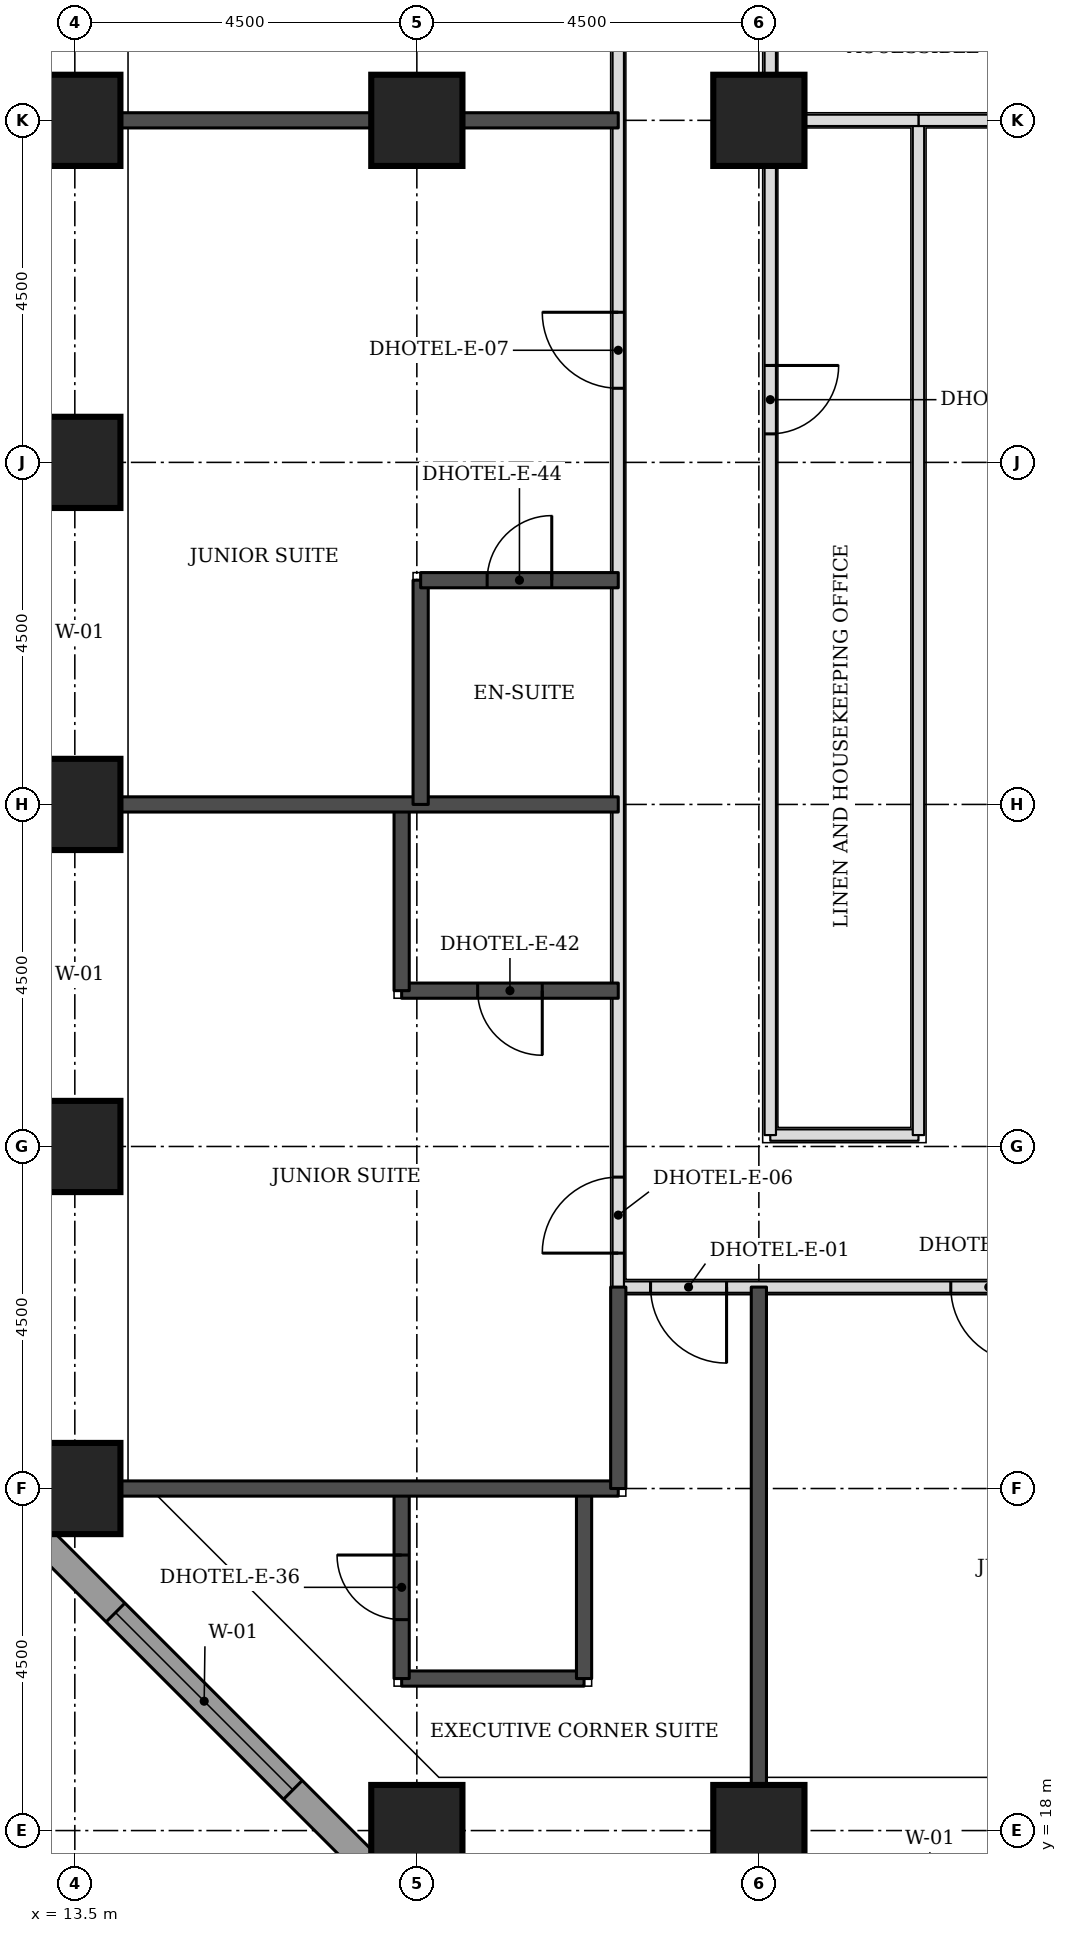
"""IFC4 building model, lengths in metres.
Left out: names, types, materials, properties, quantities, classifications, styles, units other than length and angle.
Written with IfcOpenShell. Run it as: python <this file> out.ifc"""

import sys

from ifc_helpers import new_model, si_unit, direction, frame, frame_2d, origin, origin_2d, place, context, subcontext, project, spatial, rectangle, extrude, element, fill, save


model = new_model("IFC4")
c1 = context("Model", 3, precision=1e-05, world=origin(), true_north=direction((0.0, 1.0)))
c2 = subcontext(c1, "Body", "Model", "MODEL_VIEW")
j1 = project(units=[si_unit("LENGTHUNIT", "METRE"), si_unit("PLANEANGLEUNIT", "RADIAN")], contexts=[c1])
p1 = place(None, origin())
s1 = spatial("IfcSite", under=j1, at=p1, CompositionType="ELEMENT")
p2 = place(p1, origin())
s2 = spatial("IfcBuilding", under=s1, at=p2, CompositionType="ELEMENT")
p3 = place(p2, frame((0.0, 0.0, 62.7)))
s3 = spatial("IfcBuildingStorey", under=s2, at=p3, CompositionType="ELEMENT", Elevation=62.7)
for number, where, z_axis, x_axis in (
    (1, (18.0, 18.0, 0.0), (0.0, 0.0, 1.0), (1.0, 0.0, 0.0)),
    (2, (22.5, 18.0, 0.0), (0.0, 0.0, 1.0), (1.0, 0.0, 0.0)),
    (3, (13.5, 22.5, 0.0), (0.0, 0.0, 1.0), (1.0, 0.0, 0.0)),
    (4, (13.5, 27.0, 0.0), (0.0, 0.0, 1.0), (1.0, 0.0, 0.0)),
    (5, (13.5, 31.5, 0.0), (0.0, 0.0, 1.0), (1.0, 0.0, 0.0)),
    (6, (13.5, 36.0, 0.0), (0.0, 0.0, 1.0), (1.0, 0.0, 0.0)),
    (7, (13.5, 40.5, 0.0), (0.0, 0.0, 1.0), (1.0, 0.0, 0.0)),
    (8, (18.0, 40.5, 0.0), (0.0, 0.0, 1.0), (1.0, 0.0, 0.0)),
    (9, (22.5, 40.5, 0.0), (0.0, 0.0, 1.0), (1.0, 0.0, 0.0)),
):
    element("IfcColumn", number, at=place(p3, frame(where, z_axis=z_axis, x_axis=x_axis)), inside=s3, PredefinedType="COLUMN", context=c2, shape_type="SweptSolid", body=[
        extrude(rectangle(XDim=1.2, YDim=1.2, at=origin_2d()), origin(), (0.0, 0.0, 1.0), 3.3),
    ])
p4 = place(p3, frame((12.674, 22.23, 0.0), z_axis=(0.0, 0.0, 1.0), x_axis=(0.707106781187, -0.707106781187, 0.0)))
e10 = element("IfcWall", 10, at=p4, inside=s3, PredefinedType="STANDARD", context=c2, shape_type="SweptSolid", body=[
    extrude(rectangle(XDim=7.151, YDim=0.35, at=frame_2d((3.576, 0.0))), origin(), (0.0, 0.0, 1.0), 3.055),
])
p5 = place(p4, frame((1.926, 0.0, 0.8)))
e11 = element("IfcOpeningElement", 11, at=p5, cuts=e10, PredefinedType="OPENING", context=c2, shape_type="SweptSolid", body=[
    extrude(rectangle(XDim=3.3, YDim=1.5, at=frame_2d((1.65, 0.75))), frame((0.0, 0.185, 0.0), z_axis=(0.0, -1.0, 0.0), x_axis=(1.0, 0.0, 0.0)), (0.0, 0.0, 1.0), 0.37),
])
p6 = place(p3, frame((20.65, 25.15, 0.0), z_axis=(0.0, 0.0, 1.0), x_axis=(1.0, 0.0, 0.0)))
e12 = element("IfcWall", 12, at=p6, inside=s3, PredefinedType="PARTITIONING", context=c2, shape_type="SweptSolid", body=[
    extrude(rectangle(XDim=32.2, YDim=0.15, at=frame_2d((16.1, 0.0))), origin(), (0.0, 0.0, 1.0), 3.08),
])
p7 = place(p6, frame((4.375, 0.0, 0.0)))
e13 = element("IfcOpeningElement", 13, at=p7, cuts=e12, PredefinedType="OPENING", context=c2, shape_type="SweptSolid", body=[
    extrude(rectangle(XDim=1.0, YDim=2.1, at=frame_2d((0.5, 1.05))), frame((0.0, 0.085, 0.0), z_axis=(0.0, -1.0, 0.0), x_axis=(1.0, 0.0, 0.0)), (0.0, 0.0, 1.0), 0.17),
])
p8 = place(p6, frame((16.075, 0.0, 0.0)))
e14 = element("IfcOpeningElement", 14, at=p8, cuts=e12, PredefinedType="OPENING", context=c2, shape_type="SweptSolid", body=[
    extrude(rectangle(XDim=1.0, YDim=2.1, at=frame_2d((0.5, 1.05))), frame((0.0, 0.085, 0.0), z_axis=(0.0, -1.0, 0.0), x_axis=(1.0, 0.0, 0.0)), (0.0, 0.0, 1.0), 0.17),
])
p9 = place(p6, frame((22.375, 0.0, 0.0)))
e15 = element("IfcOpeningElement", 15, at=p9, cuts=e12, PredefinedType="OPENING", context=c2, shape_type="SweptSolid", body=[
    extrude(rectangle(XDim=1.0, YDim=2.1, at=frame_2d((0.5, 1.05))), frame((0.0, 0.085, 0.0), z_axis=(0.0, -1.0, 0.0), x_axis=(1.0, 0.0, 0.0)), (0.0, 0.0, 1.0), 0.17),
])
p10 = place(p6, frame((0.425, 0.0, 0.0)))
e16 = element("IfcOpeningElement", 16, at=p10, cuts=e12, PredefinedType="OPENING", context=c2, shape_type="SweptSolid", body=[
    extrude(rectangle(XDim=1.0, YDim=2.1, at=frame_2d((0.5, 1.05))), frame((0.0, 0.085, 0.0), z_axis=(0.0, -1.0, 0.0), x_axis=(1.0, 0.0, 0.0)), (0.0, 0.0, 1.0), 0.17),
])
p11 = place(p6, frame((30.025, 0.0, 0.0)))
e17 = element("IfcOpeningElement", 17, at=p11, cuts=e12, PredefinedType="OPENING", context=c2, shape_type="SweptSolid", body=[
    extrude(rectangle(XDim=1.0, YDim=2.1, at=frame_2d((0.5, 1.05))), frame((0.0, 0.085, 0.0), z_axis=(0.0, -1.0, 0.0), x_axis=(1.0, 0.0, 0.0)), (0.0, 0.0, 1.0), 0.17),
])
p12 = place(p3, frame((20.65, 25.15, 0.0), z_axis=(0.0, 0.0, 1.0), x_axis=(0.0, 1.0, 0.0)))
e18 = element("IfcWall", 18, at=p12, inside=s3, PredefinedType="PARTITIONING", context=c2, shape_type="SweptSolid", body=[
    extrude(rectangle(XDim=24.35, YDim=0.15, at=frame_2d((12.175, 0.0))), origin(), (0.0, 0.0, 1.0), 3.08),
])
p13 = place(p12, frame((0.447, 0.0, 0.0)))
e19 = element("IfcOpeningElement", 19, at=p13, cuts=e18, PredefinedType="OPENING", context=c2, shape_type="SweptSolid", body=[
    extrude(rectangle(XDim=1.0, YDim=2.1, at=frame_2d((0.5, 1.05))), frame((0.0, 0.085, 0.0), z_axis=(0.0, -1.0, 0.0), x_axis=(1.0, 0.0, 0.0)), (0.0, 0.0, 1.0), 0.17),
])
p14 = place(p12, frame((11.825, 0.0, 0.0)))
e20 = element("IfcOpeningElement", 20, at=p14, cuts=e18, PredefinedType="OPENING", context=c2, shape_type="SweptSolid", body=[
    extrude(rectangle(XDim=1.0, YDim=2.1, at=frame_2d((0.5, 1.05))), frame((0.0, 0.085, 0.0), z_axis=(0.0, -1.0, 0.0), x_axis=(1.0, 0.0, 0.0)), (0.0, 0.0, 1.0), 0.17),
])
p15 = place(p12, frame((18.125, 0.0, 0.0)))
e21 = element("IfcOpeningElement", 21, at=p15, cuts=e18, PredefinedType="OPENING", context=c2, shape_type="SweptSolid", body=[
    extrude(rectangle(XDim=1.0, YDim=2.1, at=frame_2d((0.5, 1.05))), frame((0.0, 0.085, 0.0), z_axis=(0.0, -1.0, 0.0), x_axis=(1.0, 0.0, 0.0)), (0.0, 0.0, 1.0), 0.17),
])
p16 = place(p3, frame((22.65, 27.15, 0.0), z_axis=(0.0, 0.0, 1.0), x_axis=(1.0, 0.0, 0.0)))
e22 = element("IfcWall", 22, at=p16, inside=s3, PredefinedType="PARTITIONING", context=c2, shape_type="SweptSolid", body=[
    extrude(rectangle(XDim=1.95, YDim=0.15, at=frame_2d((0.975, 0.0))), origin(), (0.0, 0.0, 1.0), 3.08),
])
p17 = place(p3, frame((22.65, 27.15, 0.0), z_axis=(0.0, 0.0, 1.0), x_axis=(0.0, 1.0, 0.0)))
e23 = element("IfcWall", 23, at=p17, inside=s3, PredefinedType="PARTITIONING", context=c2, shape_type="SweptSolid", body=[
    extrude(rectangle(XDim=15.85, YDim=0.15, at=frame_2d((7.925, 0.0))), origin(), (0.0, 0.0, 1.0), 3.08),
])
p18 = place(p17, frame((9.225, 0.0, 0.0)))
e24 = element("IfcOpeningElement", 24, at=p18, cuts=e23, PredefinedType="OPENING", context=c2, shape_type="SweptSolid", body=[
    extrude(rectangle(XDim=0.9, YDim=2.1, at=frame_2d((0.45, 1.05))), frame((0.0, 0.085, 0.0), z_axis=(0.0, -1.0, 0.0), x_axis=(1.0, 0.0, 0.0)), (0.0, 0.0, 1.0), 0.17),
])
p19 = place(p3, frame((24.6, 27.15, 0.0), z_axis=(0.0, 0.0, 1.0), x_axis=(0.0, 1.0, 0.0)))
e25 = element("IfcWall", 25, at=p19, inside=s3, PredefinedType="PARTITIONING", context=c2, shape_type="SweptSolid", body=[
    extrude(rectangle(XDim=13.35, YDim=0.15, at=frame_2d((6.675, 0.0))), origin(), (0.0, 0.0, 1.0), 3.08),
])
p20 = place(p3, frame((24.6, 40.5, 0.0), z_axis=(0.0, 0.0, 1.0), x_axis=(1.0, 0.0, 0.0)))
e26 = element("IfcWall", 26, at=p20, inside=s3, PredefinedType="PARTITIONING", context=c2, shape_type="SweptSolid", body=[
    extrude(rectangle(XDim=2.35, YDim=0.15, at=frame_2d((1.175, 0.0))), origin(), (0.0, 0.0, 1.0), 2.33),
])
p21 = place(p3, frame((22.5, 18.6, 0.0), z_axis=(0.0, 0.0, 1.0), x_axis=(0.0, 1.0, 0.0)))
e27 = element("IfcWall", 27, at=p21, inside=s3, PredefinedType="SOLIDWALL", context=c2, shape_type="SweptSolid", body=[
    extrude(rectangle(XDim=6.55, YDim=0.2, at=frame_2d((3.275, 0.0))), origin(), (0.0, 0.0, 1.0), 3.08),
])
p22 = place(p3, frame((17.8, 20.0, 0.0), z_axis=(0.0, 0.0, 1.0), x_axis=(1.0, 0.0, 0.0)))
e28 = element("IfcWall", 28, at=p22, inside=s3, PredefinedType="SOLIDWALL", context=c2, shape_type="SweptSolid", body=[
    extrude(rectangle(XDim=2.4, YDim=0.2, at=frame_2d((1.2, 0.0))), origin(), (0.0, 0.0, 1.0), 3.08),
])
p23 = place(p3, frame((17.8, 20.0, 0.0), z_axis=(0.0, 0.0, 1.0), x_axis=(0.0, 1.0, 0.0)))
e29 = element("IfcWall", 29, at=p23, inside=s3, PredefinedType="SOLIDWALL", context=c2, shape_type="SweptSolid", body=[
    extrude(rectangle(XDim=2.5, YDim=0.2, at=frame_2d((1.25, 0.0))), origin(), (0.0, 0.0, 1.0), 3.08),
])
p24 = place(p23, frame((0.775, 0.0, 0.0)))
e30 = element("IfcOpeningElement", 30, at=p24, cuts=e29, PredefinedType="OPENING", context=c2, shape_type="SweptSolid", body=[
    extrude(rectangle(XDim=0.85, YDim=2.1, at=frame_2d((0.425, 1.05))), frame((0.0, 0.11, 0.0), z_axis=(0.0, -1.0, 0.0), x_axis=(1.0, 0.0, 0.0)), (0.0, 0.0, 1.0), 0.22),
])
p25 = place(p3, frame((20.2, 20.0, 0.0), z_axis=(0.0, 0.0, 1.0), x_axis=(0.0, 1.0, 0.0)))
e31 = element("IfcWall", 31, at=p25, inside=s3, PredefinedType="SOLIDWALL", context=c2, shape_type="SweptSolid", body=[
    extrude(rectangle(XDim=2.5, YDim=0.2, at=frame_2d((1.25, 0.0))), origin(), (0.0, 0.0, 1.0), 3.08),
])
p26 = place(p3, frame((14.1, 22.5, 0.0), z_axis=(0.0, 0.0, 1.0), x_axis=(1.0, 0.0, 0.0)))
e32 = element("IfcWall", 32, at=p26, inside=s3, PredefinedType="SOLIDWALL", context=c2, shape_type="SweptSolid", body=[
    extrude(rectangle(XDim=6.55, YDim=0.2, at=frame_2d((3.275, 0.0))), origin(), (0.0, 0.0, 1.0), 3.08),
])
p27 = place(p3, frame((20.65, 22.5, 0.0), z_axis=(0.0, 0.0, 1.0), x_axis=(0.0, 1.0, 0.0)))
e33 = element("IfcWall", 33, at=p27, inside=s3, PredefinedType="SOLIDWALL", context=c2, shape_type="SweptSolid", body=[
    extrude(rectangle(XDim=2.65, YDim=0.2, at=frame_2d((1.325, 0.0))), origin(), (0.0, 0.0, 1.0), 3.08),
])
p28 = place(p3, frame((17.8, 29.05, 0.0), z_axis=(0.0, 0.0, 1.0), x_axis=(1.0, 0.0, 0.0)))
e34 = element("IfcWall", 34, at=p28, inside=s3, PredefinedType="SOLIDWALL", context=c2, shape_type="SweptSolid", body=[
    extrude(rectangle(XDim=2.85, YDim=0.2, at=frame_2d((1.425, 0.0))), origin(), (0.0, 0.0, 1.0), 3.08),
])
p29 = place(p28, frame((1.0, 0.0, 0.0)))
e35 = element("IfcOpeningElement", 35, at=p29, cuts=e34, PredefinedType="OPENING", context=c2, shape_type="SweptSolid", body=[
    extrude(rectangle(XDim=0.85, YDim=2.1, at=frame_2d((0.425, 1.05))), frame((0.0, 0.11, 0.0), z_axis=(0.0, -1.0, 0.0), x_axis=(1.0, 0.0, 0.0)), (0.0, 0.0, 1.0), 0.22),
])
p30 = place(p3, frame((17.8, 29.05, 0.0), z_axis=(0.0, 0.0, 1.0), x_axis=(0.0, 1.0, 0.0)))
e36 = element("IfcWall", 36, at=p30, inside=s3, PredefinedType="SOLIDWALL", context=c2, shape_type="SweptSolid", body=[
    extrude(rectangle(XDim=2.45, YDim=0.2, at=frame_2d((1.225, 0.0))), origin(), (0.0, 0.0, 1.0), 3.08),
])
p31 = place(p3, frame((14.1, 31.5, 0.0), z_axis=(0.0, 0.0, 1.0), x_axis=(1.0, 0.0, 0.0)))
e37 = element("IfcWall", 37, at=p31, inside=s3, PredefinedType="SOLIDWALL", context=c2, shape_type="SweptSolid", body=[
    extrude(rectangle(XDim=6.55, YDim=0.2, at=frame_2d((3.275, 0.0))), origin(), (0.0, 0.0, 1.0), 3.08),
])
p32 = place(p3, frame((18.05, 31.5, 0.0), z_axis=(0.0, 0.0, 1.0), x_axis=(0.0, 1.0, 0.0)))
e38 = element("IfcWall", 38, at=p32, inside=s3, PredefinedType="SOLIDWALL", context=c2, shape_type="SweptSolid", body=[
    extrude(rectangle(XDim=2.95, YDim=0.2, at=frame_2d((1.475, 0.0))), origin(), (0.0, 0.0, 1.0), 3.08),
])
p33 = place(p3, frame((18.05, 34.45, 0.0), z_axis=(0.0, 0.0, 1.0), x_axis=(1.0, 0.0, 0.0)))
e39 = element("IfcWall", 39, at=p33, inside=s3, PredefinedType="SOLIDWALL", context=c2, shape_type="SweptSolid", body=[
    extrude(rectangle(XDim=2.6, YDim=0.2, at=frame_2d((1.3, 0.0))), origin(), (0.0, 0.0, 1.0), 3.08),
])
p34 = place(p33, frame((0.875, 0.0, 0.0)))
e40 = element("IfcOpeningElement", 40, at=p34, cuts=e39, PredefinedType="OPENING", context=c2, shape_type="SweptSolid", body=[
    extrude(rectangle(XDim=0.85, YDim=2.1, at=frame_2d((0.425, 1.05))), frame((0.0, 0.11, 0.0), z_axis=(0.0, -1.0, 0.0), x_axis=(1.0, 0.0, 0.0)), (0.0, 0.0, 1.0), 0.22),
])
p35 = place(p3, frame((14.1, 40.5, 0.0), z_axis=(0.0, 0.0, 1.0), x_axis=(1.0, 0.0, 0.0)))
e41 = element("IfcWall", 41, at=p35, inside=s3, PredefinedType="SOLIDWALL", context=c2, shape_type="SweptSolid", body=[
    extrude(rectangle(XDim=6.55, YDim=0.2, at=frame_2d((3.275, 0.0))), origin(), (0.0, 0.0, 1.0), 3.08),
])
p36 = place(p3, frame((22.65, 40.5, 0.0), z_axis=(0.0, 0.0, 1.0), x_axis=(1.0, 0.0, 0.0)))
e42 = element("IfcWall", 42, at=p36, inside=s3, PredefinedType="PARTITIONING", context=c2, shape_type="SweptSolid", body=[
    extrude(rectangle(XDim=1.95, YDim=0.15, at=frame_2d((0.975, 0.0))), origin(), (0.0, 0.0, 1.0), 2.33),
])
p37 = place(p5, origin())
e43 = element("IfcWindow", 43, at=p37, inside=s3, PartitioningType="SINGLE_PANEL", PredefinedType="WINDOW", context=c2, shape_type="SweptSolid", body=[
    extrude(rectangle(XDim=3.3, YDim=1.5, at=frame_2d((1.65, 0.75))), frame((0.0, 0.085, 0.0), z_axis=(0.0, -1.0, 0.0), x_axis=(1.0, 0.0, 0.0)), (0.0, 0.0, 1.0), 0.06),
])
fill(e11, e43)
p38 = place(p7, frame((1.0, 0.0, 0.0), z_axis=(0.0, 0.0, 1.0), x_axis=(-1.0, 0.0, 0.0)))
e44 = element("IfcDoor", 44, at=p38, inside=s3, OperationType="SINGLE_SWING_LEFT", PredefinedType="DOOR", context=c2, shape_type="SweptSolid", body=[
    extrude(rectangle(XDim=1.0, YDim=2.1, at=frame_2d((0.5, 1.05))), frame((0.0, 0.025, 0.0), z_axis=(0.0, -1.0, 0.0), x_axis=(1.0, 0.0, 0.0)), (0.0, 0.0, 1.0), 0.05),
])
fill(e13, e44)
p39 = place(p13, origin())
e45 = element("IfcDoor", 45, at=p39, inside=s3, OperationType="SINGLE_SWING_LEFT", PredefinedType="DOOR", context=c2, shape_type="SweptSolid", body=[
    extrude(rectangle(XDim=1.0, YDim=2.1, at=frame_2d((0.5, 1.05))), frame((0.0, 0.025, 0.0), z_axis=(0.0, -1.0, 0.0), x_axis=(1.0, 0.0, 0.0)), (0.0, 0.0, 1.0), 0.05),
])
fill(e19, e45)
p40 = place(p29, frame((0.85, 0.0, 0.0), z_axis=(0.0, 0.0, 1.0), x_axis=(-1.0, 0.0, 0.0)))
e46 = element("IfcDoor", 46, at=p40, inside=s3, OperationType="SINGLE_SWING_LEFT", PredefinedType="DOOR", context=c2, shape_type="SweptSolid", body=[
    extrude(rectangle(XDim=0.85, YDim=2.1, at=frame_2d((0.425, 1.05))), frame((0.0, 0.025, 0.0), z_axis=(0.0, -1.0, 0.0), x_axis=(1.0, 0.0, 0.0)), (0.0, 0.0, 1.0), 0.05),
])
fill(e35, e46)
p41 = place(p14, origin())
e47 = element("IfcDoor", 47, at=p41, inside=s3, OperationType="SINGLE_SWING_RIGHT", PredefinedType="DOOR", context=c2, shape_type="SweptSolid", body=[
    extrude(rectangle(XDim=1.0, YDim=2.1, at=frame_2d((0.5, 1.05))), frame((0.0, 0.025, 0.0), z_axis=(0.0, -1.0, 0.0), x_axis=(1.0, 0.0, 0.0)), (0.0, 0.0, 1.0), 0.05),
])
fill(e20, e47)
p42 = place(p34, origin())
e48 = element("IfcDoor", 48, at=p42, inside=s3, OperationType="SINGLE_SWING_RIGHT", PredefinedType="DOOR", context=c2, shape_type="SweptSolid", body=[
    extrude(rectangle(XDim=0.85, YDim=2.1, at=frame_2d((0.425, 1.05))), frame((0.0, 0.025, 0.0), z_axis=(0.0, -1.0, 0.0), x_axis=(1.0, 0.0, 0.0)), (0.0, 0.0, 1.0), 0.05),
])
fill(e40, e48)
p43 = place(p10, frame((1.0, 0.0, 0.0), z_axis=(0.0, 0.0, 1.0), x_axis=(-1.0, 0.0, 0.0)))
e49 = element("IfcDoor", 49, at=p43, inside=s3, OperationType="SINGLE_SWING_LEFT", PredefinedType="DOOR", context=c2, shape_type="SweptSolid", body=[
    extrude(rectangle(XDim=1.0, YDim=2.1, at=frame_2d((0.5, 1.05))), frame((0.0, 0.025, 0.0), z_axis=(0.0, -1.0, 0.0), x_axis=(1.0, 0.0, 0.0)), (0.0, 0.0, 1.0), 0.05),
])
fill(e16, e49)
p44 = place(p24, origin())
e50 = element("IfcDoor", 50, at=p44, inside=s3, OperationType="SINGLE_SWING_RIGHT", PredefinedType="DOOR", context=c2, shape_type="SweptSolid", body=[
    extrude(rectangle(XDim=0.85, YDim=2.1, at=frame_2d((0.425, 1.05))), frame((0.0, 0.025, 0.0), z_axis=(0.0, -1.0, 0.0), x_axis=(1.0, 0.0, 0.0)), (0.0, 0.0, 1.0), 0.05),
])
fill(e30, e50)
p45 = place(p18, frame((0.9, 0.0, 0.0), z_axis=(0.0, 0.0, 1.0), x_axis=(-1.0, 0.0, 0.0)))
e51 = element("IfcDoor", 51, at=p45, inside=s3, OperationType="SINGLE_SWING_LEFT", PredefinedType="DOOR", context=c2, shape_type="SweptSolid", body=[
    extrude(rectangle(XDim=0.9, YDim=2.1, at=frame_2d((0.45, 1.05))), frame((0.0, 0.025, 0.0), z_axis=(0.0, -1.0, 0.0), x_axis=(1.0, 0.0, 0.0)), (0.0, 0.0, 1.0), 0.05),
])
fill(e24, e51)
save(model, sys.argv[1])
